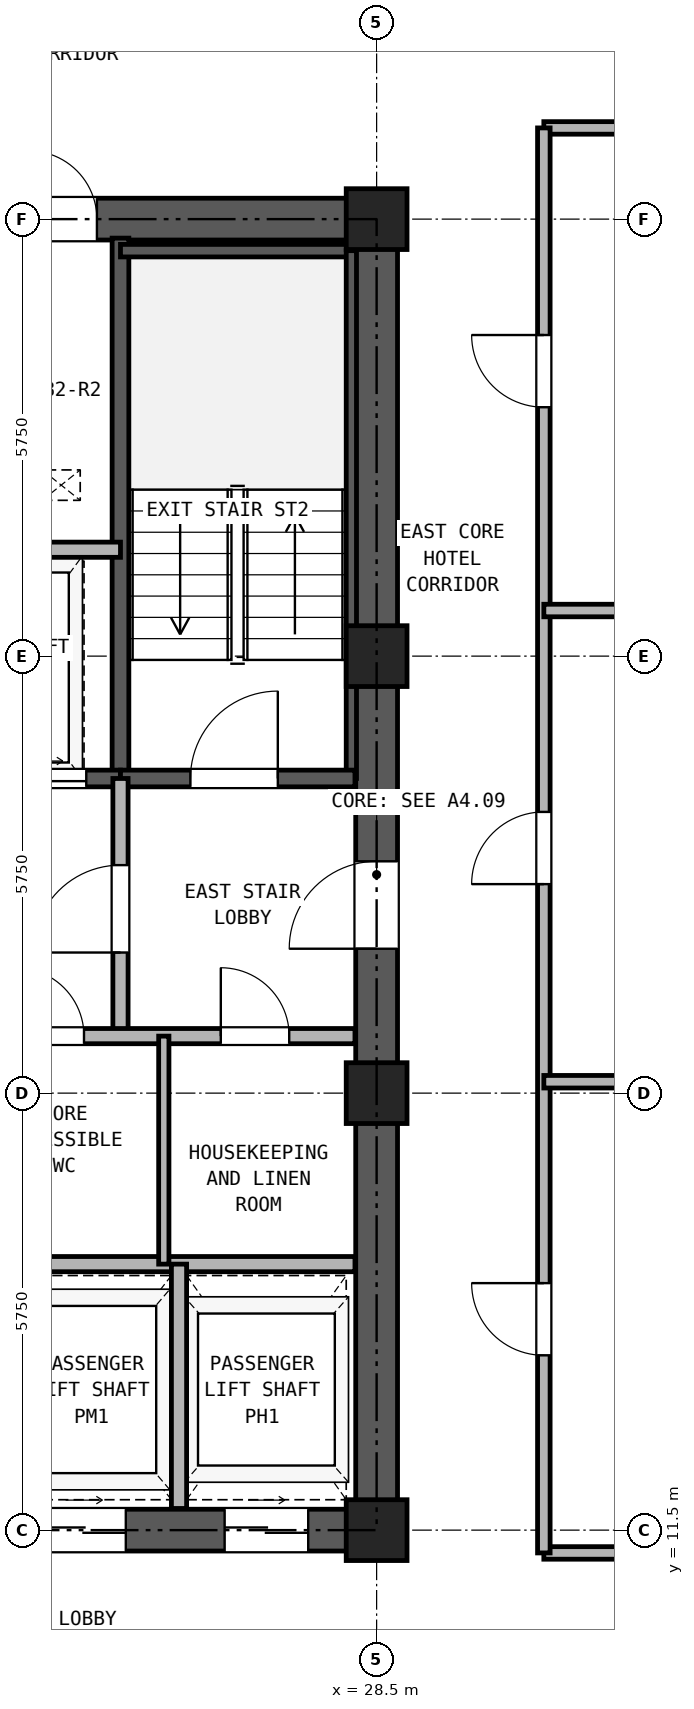
"""IFC4 building model, lengths in metres.
Left out: names, types, materials, properties, quantities, classifications, styles, units other than length and angle.
Written with IfcOpenShell. Run it as: python <this file> out.ifc"""

import sys

from ifc_helpers import new_model, si_unit, direction, frame, frame_2d, origin, origin_2d, place, context, subcontext, project, spatial, rectangle, hollow_rectangle, extrude, source, transform, mapped, element, fill, save


model = new_model("IFC4")
c1 = context("Model", 3, precision=1e-05, world=origin(), true_north=direction((0.0, 1.0)))
c2 = subcontext(c1, "Body", "Model", "MODEL_VIEW")
j1 = project(units=[si_unit("LENGTHUNIT", "METRE"), si_unit("PLANEANGLEUNIT", "RADIAN")], contexts=[c1])
p1 = place(None, origin())
s1 = spatial("IfcSite", under=j1, at=p1, CompositionType="ELEMENT")
p2 = place(p1, origin())
s2 = spatial("IfcBuilding", under=s1, at=p2, CompositionType="ELEMENT")
p3 = place(p2, frame((0.0, 0.0, 118.3)))
s3 = spatial("IfcBuildingStorey", under=s2, at=p3, CompositionType="ELEMENT", Elevation=118.3)
m1 = source(origin(), c2, "Body", "SweptSolid", [
    extrude(hollow_rectangle(XDim=0.8, YDim=0.8, WallThickness=0.045, at=origin_2d()), origin(), (0.0, 0.0, 1.0), 2.95),
])
for number, where, z_axis, x_axis in (
    (1, (28.5, 11.5, 0.0), (0.0, 0.0, 1.0), (1.0, 0.0, 0.0)),
    (2, (28.5, 17.25, 0.0), (0.0, 0.0, 1.0), (1.0, 0.0, 0.0)),
    (3, (28.5, 23.0, 0.0), (0.0, 0.0, 1.0), (1.0, 0.0, 0.0)),
    (4, (28.5, 28.75, 0.0), (0.0, 0.0, 1.0), (1.0, 0.0, 0.0)),
):
    element("IfcColumn", number, at=place(p3, frame(where, z_axis=z_axis, x_axis=x_axis)), inside=s3, PredefinedType="COLUMN", context=c2, shape_type="MappedRepresentation", body=[
        mapped(m1, transform((0.0, 0.0, 0.0), x_axis=(1.0, 0.0, 0.0), y_axis=(0.0, 1.0, 0.0), z_axis=(0.0, 0.0, 1.0), scale=1.0)),
    ])
p4 = place(p3, frame((18.225, 11.5, 0.0), z_axis=(0.0, 0.0, 1.0), x_axis=(1.0, 0.0, 0.0)))
e5 = element("IfcWall", 5, at=p4, inside=s3, PredefinedType="SHEAR", context=c2, shape_type="SweptSolid", body=[
    extrude(rectangle(XDim=10.55, YDim=0.55, at=frame_2d((5.275, 0.0))), origin(), (0.0, 0.0, 1.0), 2.95),
])
p5 = place(p4, frame((2.375, 0.0, 0.0)))
e6 = element("IfcOpeningElement", 6, at=p5, cuts=e5, PredefinedType="OPENING", context=c2, shape_type="SweptSolid", body=[
    extrude(rectangle(XDim=0.95, YDim=2.15, at=frame_2d((0.475, 1.075))), frame((0.0, 0.285, 0.0), z_axis=(0.0, -1.0, 0.0), x_axis=(1.0, 0.0, 0.0)), (0.0, 0.0, 1.0), 0.57),
])
p6 = place(p4, frame((5.875, 0.0, 0.0)))
e7 = element("IfcOpeningElement", 7, at=p6, cuts=e5, PredefinedType="OPENING", context=c2, shape_type="SweptSolid", body=[
    extrude(rectangle(XDim=1.1, YDim=2.25, at=frame_2d((0.55, 1.125))), frame((0.0, 0.285, 0.0), z_axis=(0.0, -1.0, 0.0), x_axis=(1.0, 0.0, 0.0)), (0.0, 0.0, 1.0), 0.57),
])
p7 = place(p4, frame((8.275, 0.0, 0.0)))
e8 = element("IfcOpeningElement", 8, at=p7, cuts=e5, PredefinedType="OPENING", context=c2, shape_type="SweptSolid", body=[
    extrude(rectangle(XDim=1.1, YDim=2.25, at=frame_2d((0.55, 1.125))), frame((0.0, 0.285, 0.0), z_axis=(0.0, -1.0, 0.0), x_axis=(1.0, 0.0, 0.0)), (0.0, 0.0, 1.0), 0.57),
])
p8 = place(p3, frame((18.225, 28.75, 0.0), z_axis=(0.0, 0.0, 1.0), x_axis=(1.0, 0.0, 0.0)))
e9 = element("IfcWall", 9, at=p8, inside=s3, PredefinedType="SHEAR", context=c2, shape_type="SweptSolid", body=[
    extrude(rectangle(XDim=10.55, YDim=0.55, at=frame_2d((5.275, 0.0))), origin(), (0.0, 0.0, 1.0), 2.95),
])
p9 = place(p8, frame((4.155, 0.0, 0.0)))
e10 = element("IfcOpeningElement", 10, at=p9, cuts=e9, PredefinedType="OPENING", context=c2, shape_type="SweptSolid", body=[
    extrude(rectangle(XDim=0.9, YDim=2.05, at=frame_2d((0.45, 1.025))), frame((0.0, 0.285, 0.0), z_axis=(0.0, -1.0, 0.0), x_axis=(1.0, 0.0, 0.0)), (0.0, 0.0, 1.0), 0.57),
])
p10 = place(p8, frame((5.695, 0.0, 0.0)))
e11 = element("IfcOpeningElement", 11, at=p10, cuts=e9, PredefinedType="OPENING", context=c2, shape_type="SweptSolid", body=[
    extrude(rectangle(XDim=0.9, YDim=2.05, at=frame_2d((0.45, 1.025))), frame((0.0, 0.285, 0.0), z_axis=(0.0, -1.0, 0.0), x_axis=(1.0, 0.0, 0.0)), (0.0, 0.0, 1.0), 0.57),
])
p11 = place(p3, frame((28.5, 11.775, 0.0), z_axis=(0.0, 0.0, 1.0), x_axis=(0.0, 1.0, 0.0)))
e12 = element("IfcWall", 12, at=p11, inside=s3, PredefinedType="SHEAR", context=c2, shape_type="SweptSolid", body=[
    extrude(rectangle(XDim=16.7, YDim=0.55, at=frame_2d((8.35, 0.0))), origin(), (0.0, 0.0, 1.0), 2.95),
])
p12 = place(p11, frame((7.375, 0.0, 0.0)))
e13 = element("IfcOpeningElement", 13, at=p12, cuts=e12, PredefinedType="OPENING", context=c2, shape_type="SweptSolid", body=[
    extrude(rectangle(XDim=1.15, YDim=2.2, at=frame_2d((0.575, 1.1))), frame((0.0, 0.285, 0.0), z_axis=(0.0, -1.0, 0.0), x_axis=(1.0, 0.0, 0.0)), (0.0, 0.0, 1.0), 0.57),
])
p13 = place(p3, frame((25.13, 21.39, 0.0), z_axis=(0.0, 0.0, 1.0), x_axis=(0.0, 1.0, 0.0)))
e14 = element("IfcWall", 14, at=p13, inside=s3, PredefinedType="SOLIDWALL", context=c2, shape_type="SweptSolid", body=[
    extrude(rectangle(XDim=7.11, YDim=0.22, at=frame_2d((3.555, 0.0))), origin(), (0.0, 0.0, 1.0), 2.95),
])
p14 = place(p3, frame((25.13, 28.335, 0.0), z_axis=(0.0, 0.0, 1.0), x_axis=(1.0, 0.0, 0.0)))
e15 = element("IfcWall", 15, at=p14, inside=s3, PredefinedType="PARTITIONING", context=c2, shape_type="SweptSolid", body=[
    extrude(rectangle(XDim=3.085, YDim=0.165, at=frame_2d((1.542, 0.0))), origin(), (0.0, 0.0, 1.0), 2.95),
])
p15 = place(p3, frame((28.167, 21.39, 0.0), z_axis=(0.0, 0.0, 1.0), x_axis=(0.0, 1.0, 0.0)))
e16 = element("IfcWall", 16, at=p15, inside=s3, PredefinedType="PARTITIONING", context=c2, shape_type="SweptSolid", body=[
    extrude(rectangle(XDim=6.945, YDim=0.135, at=frame_2d((3.473, 0.0))), origin(), (0.0, 0.0, 1.0), 2.95),
])
p16 = place(p3, frame((18.785, 21.39, 0.0), z_axis=(0.0, 0.0, 1.0), x_axis=(1.0, 0.0, 0.0)))
e17 = element("IfcWall", 17, at=p16, inside=s3, PredefinedType="SOLIDWALL", context=c2, shape_type="SweptSolid", body=[
    extrude(rectangle(XDim=6.345, YDim=0.22, at=frame_2d((3.172, 0.0))), origin(), (0.0, 0.0, 1.0), 2.95),
])
p17 = place(p16, frame((1.065, 0.0, 0.0)))
e18 = element("IfcOpeningElement", 18, at=p17, cuts=e17, PredefinedType="OPENING", context=c2, shape_type="SweptSolid", body=[
    extrude(rectangle(XDim=1.15, YDim=2.2, at=frame_2d((0.575, 1.1))), frame((0.0, 0.12, 0.0), z_axis=(0.0, -1.0, 0.0), x_axis=(1.0, 0.0, 0.0)), (0.0, 0.0, 1.0), 0.24),
])
p18 = place(p16, frame((4.795, 0.0, 0.0)))
e19 = element("IfcOpeningElement", 19, at=p18, cuts=e17, PredefinedType="OPENING", context=c2, shape_type="SweptSolid", body=[
    extrude(rectangle(XDim=1.1, YDim=2.25, at=frame_2d((0.55, 1.125))), frame((0.0, 0.12, 0.0), z_axis=(0.0, -1.0, 0.0), x_axis=(1.0, 0.0, 0.0)), (0.0, 0.0, 1.0), 0.24),
])
p19 = place(p3, frame((25.13, 21.39, 0.0), z_axis=(0.0, 0.0, 1.0), x_axis=(1.0, 0.0, 0.0)))
e20 = element("IfcWall", 20, at=p19, inside=s3, PredefinedType="SOLIDWALL", context=c2, shape_type="SweptSolid", body=[
    extrude(rectangle(XDim=3.085, YDim=0.22, at=frame_2d((1.542, 0.0))), origin(), (0.0, 0.0, 1.0), 2.95),
])
p20 = place(p19, frame((0.92, 0.0, 0.0)))
e21 = element("IfcOpeningElement", 21, at=p20, cuts=e20, PredefinedType="OPENING", context=c2, shape_type="SweptSolid", body=[
    extrude(rectangle(XDim=1.15, YDim=2.2, at=frame_2d((0.575, 1.1))), frame((0.0, 0.12, 0.0), z_axis=(0.0, -1.0, 0.0), x_axis=(1.0, 0.0, 0.0)), (0.0, 0.0, 1.0), 0.24),
])
p21 = place(p3, frame((22.11, 24.4, 0.0), z_axis=(0.0, 0.0, 1.0), x_axis=(1.0, 0.0, 0.0)))
e22 = element("IfcWall", 22, at=p21, inside=s3, PredefinedType="PARTITIONING", context=c2, shape_type="SweptSolid", body=[
    extrude(rectangle(XDim=3.02, YDim=0.2, at=frame_2d((1.51, 0.0))), origin(), (0.0, 0.0, 1.0), 2.95),
])
p22 = place(p3, frame((25.13, 18.0, 0.0), z_axis=(0.0, 0.0, 1.0), x_axis=(0.0, 1.0, 0.0)))
e23 = element("IfcWall", 23, at=p22, inside=s3, PredefinedType="PARTITIONING", context=c2, shape_type="SweptSolid", body=[
    extrude(rectangle(XDim=3.39, YDim=0.2, at=frame_2d((1.695, 0.0))), origin(), (0.0, 0.0, 1.0), 2.95),
])
p23 = place(p22, frame((1.1, 0.0, 0.0)))
e24 = element("IfcOpeningElement", 24, at=p23, cuts=e23, PredefinedType="OPENING", context=c2, shape_type="SweptSolid", body=[
    extrude(rectangle(XDim=1.15, YDim=2.2, at=frame_2d((0.575, 1.1))), frame((0.0, 0.11, 0.0), z_axis=(0.0, -1.0, 0.0), x_axis=(1.0, 0.0, 0.0)), (0.0, 0.0, 1.0), 0.22),
])
p24 = place(p3, frame((18.785, 18.0, 0.0), z_axis=(0.0, 0.0, 1.0), x_axis=(1.0, 0.0, 0.0)))
e25 = element("IfcWall", 25, at=p24, inside=s3, PredefinedType="PARTITIONING", context=c2, shape_type="SweptSolid", body=[
    extrude(rectangle(XDim=9.43, YDim=0.2, at=frame_2d((4.715, 0.0))), origin(), (0.0, 0.0, 1.0), 2.95),
])
p25 = place(p24, frame((0.465, 0.0, 0.0)))
e26 = element("IfcOpeningElement", 26, at=p25, cuts=e25, PredefinedType="OPENING", context=c2, shape_type="SweptSolid", body=[
    extrude(rectangle(XDim=1.3, YDim=2.3, at=frame_2d((0.65, 1.15))), frame((0.0, 0.11, 0.0), z_axis=(0.0, -1.0, 0.0), x_axis=(1.0, 0.0, 0.0)), (0.0, 0.0, 1.0), 0.22),
])
p26 = place(p24, frame((2.565, 0.0, 0.0)))
e27 = element("IfcOpeningElement", 27, at=p26, cuts=e25, PredefinedType="OPENING", context=c2, shape_type="SweptSolid", body=[
    extrude(rectangle(XDim=1.3, YDim=2.3, at=frame_2d((0.65, 1.15))), frame((0.0, 0.11, 0.0), z_axis=(0.0, -1.0, 0.0), x_axis=(1.0, 0.0, 0.0)), (0.0, 0.0, 1.0), 0.22),
])
p27 = place(p24, frame((4.965, 0.0, 0.0)))
e28 = element("IfcOpeningElement", 28, at=p27, cuts=e25, PredefinedType="OPENING", context=c2, shape_type="SweptSolid", body=[
    extrude(rectangle(XDim=0.9, YDim=2.05, at=frame_2d((0.45, 1.025))), frame((0.0, 0.11, 0.0), z_axis=(0.0, -1.0, 0.0), x_axis=(1.0, 0.0, 0.0)), (0.0, 0.0, 1.0), 0.22),
])
p28 = place(p24, frame((7.665, 0.0, 0.0)))
e29 = element("IfcOpeningElement", 29, at=p28, cuts=e25, PredefinedType="OPENING", context=c2, shape_type="SweptSolid", body=[
    extrude(rectangle(XDim=0.9, YDim=2.05, at=frame_2d((0.45, 1.025))), frame((0.0, 0.11, 0.0), z_axis=(0.0, -1.0, 0.0), x_axis=(1.0, 0.0, 0.0)), (0.0, 0.0, 1.0), 0.22),
])
p29 = place(p3, frame((18.785, 15.0, 0.0), z_axis=(0.0, 0.0, 1.0), x_axis=(1.0, 0.0, 0.0)))
e30 = element("IfcWall", 30, at=p29, inside=s3, PredefinedType="PARTITIONING", context=c2, shape_type="SweptSolid", body=[
    extrude(rectangle(XDim=9.43, YDim=0.2, at=frame_2d((4.715, 0.0))), origin(), (0.0, 0.0, 1.0), 2.95),
])
p30 = place(p3, frame((25.7, 15.0, 0.0), z_axis=(0.0, 0.0, 1.0), x_axis=(0.0, 1.0, 0.0)))
e31 = element("IfcWall", 31, at=p30, inside=s3, PredefinedType="PARTITIONING", context=c2, shape_type="SweptSolid", body=[
    extrude(rectangle(XDim=3.0, YDim=0.135, at=frame_2d((1.5, 0.0))), origin(), (0.0, 0.0, 1.0), 2.95),
])
p31 = place(p3, frame((25.9, 11.785, 0.0), z_axis=(0.0, 0.0, 1.0), x_axis=(0.0, 1.0, 0.0)))
e32 = element("IfcWall", 32, at=p31, inside=s3, PredefinedType="PARTITIONING", context=c2, shape_type="SweptSolid", body=[
    extrude(rectangle(XDim=3.215, YDim=0.2, at=frame_2d((1.607, 0.0))), origin(), (0.0, 0.0, 1.0), 2.95),
])
for number, where, z_axis, x_axis in (
    (33, (30.7, 11.2, 0.0), (0.0, 0.0, 1.0), (1.0, 0.0, 0.0)),
    (34, (30.7, 29.95, 0.0), (0.0, 0.0, 1.0), (1.0, 0.0, 0.0)),
):
    element("IfcWall", number, at=place(p3, frame(where, z_axis=z_axis, x_axis=x_axis)), inside=s3, PredefinedType="PARTITIONING", context=c2, shape_type="SweptSolid", body=[
        extrude(rectangle(XDim=9.1, YDim=0.165, at=frame_2d((4.55, 0.0))), origin(), (0.0, 0.0, 1.0), 2.95),
    ])
p32 = place(p3, frame((30.7, 11.2, 0.0), z_axis=(0.0, 0.0, 1.0), x_axis=(0.0, 1.0, 0.0)))
e35 = element("IfcWall", 35, at=p32, inside=s3, PredefinedType="PARTITIONING", context=c2, shape_type="SweptSolid", body=[
    extrude(rectangle(XDim=18.75, YDim=0.165, at=frame_2d((9.375, 0.0))), origin(), (0.0, 0.0, 1.0), 2.95),
])
p33 = place(p32, frame((2.6, 0.0, 0.0)))
e36 = element("IfcOpeningElement", 36, at=p33, cuts=e35, PredefinedType="OPENING", context=c2, shape_type="SweptSolid", body=[
    extrude(rectangle(XDim=0.95, YDim=2.15, at=frame_2d((0.475, 1.075))), frame((0.0, 0.093, 0.0), z_axis=(0.0, -1.0, 0.0), x_axis=(1.0, 0.0, 0.0)), (0.0, 0.0, 1.0), 0.185),
])
p34 = place(p32, frame((8.8, 0.0, 0.0)))
e37 = element("IfcOpeningElement", 37, at=p34, cuts=e35, PredefinedType="OPENING", context=c2, shape_type="SweptSolid", body=[
    extrude(rectangle(XDim=0.95, YDim=2.15, at=frame_2d((0.475, 1.075))), frame((0.0, 0.093, 0.0), z_axis=(0.0, -1.0, 0.0), x_axis=(1.0, 0.0, 0.0)), (0.0, 0.0, 1.0), 0.185),
])
p35 = place(p32, frame((15.075, 0.0, 0.0)))
e38 = element("IfcOpeningElement", 38, at=p35, cuts=e35, PredefinedType="OPENING", context=c2, shape_type="SweptSolid", body=[
    extrude(rectangle(XDim=0.95, YDim=2.15, at=frame_2d((0.475, 1.075))), frame((0.0, 0.093, 0.0), z_axis=(0.0, -1.0, 0.0), x_axis=(1.0, 0.0, 0.0)), (0.0, 0.0, 1.0), 0.185),
])
p36 = place(p3, frame((30.7, 17.4, 0.0), z_axis=(0.0, 0.0, 1.0), x_axis=(1.0, 0.0, 0.0)))
e39 = element("IfcWall", 39, at=p36, inside=s3, PredefinedType="PARTITIONING", context=c2, shape_type="SweptSolid", body=[
    extrude(rectangle(XDim=16.14, YDim=0.165, at=frame_2d((8.07, 0.0))), origin(), (0.0, 0.0, 1.0), 2.247),
])
p37 = place(p3, frame((30.7, 23.6, 0.0), z_axis=(0.0, 0.0, 1.0), x_axis=(1.0, 0.0, 0.0)))
e40 = element("IfcWall", 40, at=p37, inside=s3, PredefinedType="PARTITIONING", context=c2, shape_type="SweptSolid", body=[
    extrude(rectangle(XDim=16.14, YDim=0.165, at=frame_2d((8.07, 0.0))), origin(), (0.0, 0.0, 1.0), 2.95),
])
p38 = place(p20, frame((1.15, 0.0, 0.0), z_axis=(0.0, 0.0, 1.0), x_axis=(-1.0, 0.0, 0.0)))
e41 = element("IfcDoor", 41, at=p38, inside=s3, OperationType="SINGLE_SWING_RIGHT", PredefinedType="DOOR", context=c2, shape_type="SweptSolid", body=[
    extrude(rectangle(XDim=1.15, YDim=2.2, at=frame_2d((0.575, 1.1))), frame((0.0, 0.025, 0.0), z_axis=(0.0, -1.0, 0.0), x_axis=(1.0, 0.0, 0.0)), (0.0, 0.0, 1.0), 0.05),
])
fill(e21, e41)
p39 = place(p18, frame((1.1, 0.0, 0.0), z_axis=(0.0, 0.0, 1.0), x_axis=(-1.0, 0.0, 0.0)))
e42 = element("IfcDoor", 42, at=p39, inside=s3, OperationType="DOUBLE_DOOR_SLIDING", PredefinedType="DOOR", context=c2, shape_type="SweptSolid", body=[
    extrude(rectangle(XDim=1.1, YDim=2.25, at=frame_2d((0.55, 1.125))), frame((0.0, 0.025, 0.0), z_axis=(0.0, -1.0, 0.0), x_axis=(1.0, 0.0, 0.0)), (0.0, 0.0, 1.0), 0.05),
])
fill(e19, e42)
p40 = place(p23, origin())
e43 = element("IfcDoor", 43, at=p40, inside=s3, OperationType="SINGLE_SWING_LEFT", PredefinedType="DOOR", context=c2, shape_type="SweptSolid", body=[
    extrude(rectangle(XDim=1.15, YDim=2.2, at=frame_2d((0.575, 1.1))), frame((0.0, 0.025, 0.0), z_axis=(0.0, -1.0, 0.0), x_axis=(1.0, 0.0, 0.0)), (0.0, 0.0, 1.0), 0.05),
])
fill(e24, e43)
p41 = place(p27, frame((0.9, 0.0, 0.0), z_axis=(0.0, 0.0, 1.0), x_axis=(-1.0, 0.0, 0.0)))
e44 = element("IfcDoor", 44, at=p41, inside=s3, OperationType="SINGLE_SWING_LEFT", PredefinedType="DOOR", context=c2, shape_type="SweptSolid", body=[
    extrude(rectangle(XDim=0.9, YDim=2.05, at=frame_2d((0.45, 1.025))), frame((0.0, 0.025, 0.0), z_axis=(0.0, -1.0, 0.0), x_axis=(1.0, 0.0, 0.0)), (0.0, 0.0, 1.0), 0.05),
])
fill(e28, e44)
p42 = place(p28, frame((0.9, 0.0, 0.0), z_axis=(0.0, 0.0, 1.0), x_axis=(-1.0, 0.0, 0.0)))
e45 = element("IfcDoor", 45, at=p42, inside=s3, OperationType="SINGLE_SWING_LEFT", PredefinedType="DOOR", context=c2, shape_type="SweptSolid", body=[
    extrude(rectangle(XDim=0.9, YDim=2.05, at=frame_2d((0.45, 1.025))), frame((0.0, 0.025, 0.0), z_axis=(0.0, -1.0, 0.0), x_axis=(1.0, 0.0, 0.0)), (0.0, 0.0, 1.0), 0.05),
])
fill(e29, e45)
p43 = place(p12, origin())
e46 = element("IfcDoor", 46, at=p43, inside=s3, OperationType="SINGLE_SWING_LEFT", PredefinedType="DOOR", context=c2, shape_type="SweptSolid", body=[
    extrude(rectangle(XDim=1.15, YDim=2.2, at=frame_2d((0.575, 1.1))), frame((0.0, 0.025, 0.0), z_axis=(0.0, -1.0, 0.0), x_axis=(1.0, 0.0, 0.0)), (0.0, 0.0, 1.0), 0.05),
])
fill(e13, e46)
p44 = place(p10, origin())
e47 = element("IfcDoor", 47, at=p44, inside=s3, OperationType="SINGLE_SWING_LEFT", PredefinedType="DOOR", context=c2, shape_type="SweptSolid", body=[
    extrude(rectangle(XDim=0.9, YDim=2.05, at=frame_2d((0.45, 1.025))), frame((0.0, 0.025, 0.0), z_axis=(0.0, -1.0, 0.0), x_axis=(1.0, 0.0, 0.0)), (0.0, 0.0, 1.0), 0.05),
])
fill(e11, e47)
p45 = place(p6, frame((1.1, 0.0, 0.0), z_axis=(0.0, 0.0, 1.0), x_axis=(-1.0, 0.0, 0.0)))
e48 = element("IfcDoor", 48, at=p45, inside=s3, OperationType="DOUBLE_DOOR_SLIDING", PredefinedType="DOOR", context=c2, shape_type="SweptSolid", body=[
    extrude(rectangle(XDim=1.1, YDim=2.25, at=frame_2d((0.55, 1.125))), frame((0.0, 0.025, 0.0), z_axis=(0.0, -1.0, 0.0), x_axis=(1.0, 0.0, 0.0)), (0.0, 0.0, 1.0), 0.05),
])
fill(e7, e48)
p46 = place(p7, frame((1.1, 0.0, 0.0), z_axis=(0.0, 0.0, 1.0), x_axis=(-1.0, 0.0, 0.0)))
e49 = element("IfcDoor", 49, at=p46, inside=s3, OperationType="DOUBLE_DOOR_SLIDING", PredefinedType="DOOR", context=c2, shape_type="SweptSolid", body=[
    extrude(rectangle(XDim=1.1, YDim=2.25, at=frame_2d((0.55, 1.125))), frame((0.0, 0.025, 0.0), z_axis=(0.0, -1.0, 0.0), x_axis=(1.0, 0.0, 0.0)), (0.0, 0.0, 1.0), 0.05),
])
fill(e8, e49)
p47 = place(p33, origin())
e50 = element("IfcDoor", 50, at=p47, inside=s3, OperationType="SINGLE_SWING_RIGHT", PredefinedType="DOOR", context=c2, shape_type="SweptSolid", body=[
    extrude(rectangle(XDim=0.95, YDim=2.15, at=frame_2d((0.475, 1.075))), frame((0.0, 0.025, 0.0), z_axis=(0.0, -1.0, 0.0), x_axis=(1.0, 0.0, 0.0)), (0.0, 0.0, 1.0), 0.05),
])
fill(e36, e50)
p48 = place(p34, origin())
e51 = element("IfcDoor", 51, at=p48, inside=s3, OperationType="SINGLE_SWING_LEFT", PredefinedType="DOOR", context=c2, shape_type="SweptSolid", body=[
    extrude(rectangle(XDim=0.95, YDim=2.15, at=frame_2d((0.475, 1.075))), frame((0.0, 0.025, 0.0), z_axis=(0.0, -1.0, 0.0), x_axis=(1.0, 0.0, 0.0)), (0.0, 0.0, 1.0), 0.05),
])
fill(e37, e51)
p49 = place(p35, origin())
e52 = element("IfcDoor", 52, at=p49, inside=s3, OperationType="SINGLE_SWING_RIGHT", PredefinedType="DOOR", context=c2, shape_type="SweptSolid", body=[
    extrude(rectangle(XDim=0.95, YDim=2.15, at=frame_2d((0.475, 1.075))), frame((0.0, 0.025, 0.0), z_axis=(0.0, -1.0, 0.0), x_axis=(1.0, 0.0, 0.0)), (0.0, 0.0, 1.0), 0.05),
])
fill(e38, e52)
save(model, sys.argv[1])
